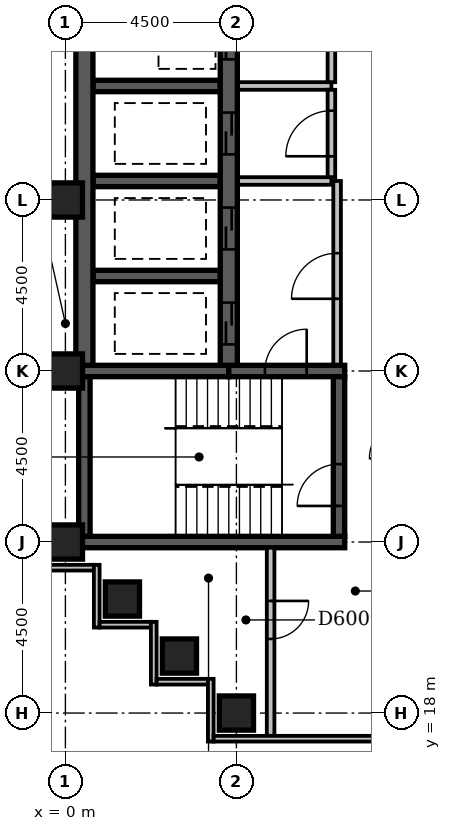
"""IFC4 building model, lengths in metres.
Left out: names, types, materials, properties, quantities, classifications, styles, units other than length and angle.
Written with IfcOpenShell. Run it as: python <this file> out.ifc"""

import sys

from ifc_helpers import new_model, si_unit, direction, frame, frame_2d, origin, origin_2d, place, context, subcontext, project, spatial, rectangle, extrude, element, fill, save


model = new_model("IFC4")
c1 = context("Model", 3, precision=1e-05, world=origin(), true_north=direction((0.0, 1.0)))
c2 = subcontext(c1, "Body", "Model", "MODEL_VIEW")
j1 = project(units=[si_unit("LENGTHUNIT", "METRE"), si_unit("PLANEANGLEUNIT", "RADIAN")], contexts=[c1])
p1 = place(None, origin())
s1 = spatial("IfcSite", under=j1, at=p1, CompositionType="ELEMENT")
p2 = place(p1, origin())
s2 = spatial("IfcBuilding", under=s1, at=p2, CompositionType="ELEMENT")
p3 = place(p2, frame((0.0, 0.0, 233.0)))
s3 = spatial("IfcBuildingStorey", under=s2, at=p3, CompositionType="ELEMENT", Elevation=233.0)
p4 = place(p3, frame((0.35, 22.5, -0.35), z_axis=(0.0, 0.0, 1.0), x_axis=(1.0, 0.0, 0.0)))
e1 = element("IfcWall", 1, at=p4, inside=s3, PredefinedType="SHEAR", context=c2, shape_type="SweptSolid", body=[
    extrude(rectangle(XDim=7.0, YDim=0.3, at=frame_2d((3.5, 0.0))), origin(), (0.0, 0.0, 1.0), 3.65),
])
p5 = place(p3, frame((0.35, 27.0, -0.35), z_axis=(0.0, 0.0, 1.0), x_axis=(1.0, 0.0, 0.0)))
e2 = element("IfcWall", 2, at=p5, inside=s3, PredefinedType="SHEAR", context=c2, shape_type="SweptSolid", body=[
    extrude(rectangle(XDim=3.95, YDim=0.3, at=frame_2d((1.975, 0.0))), origin(), (0.0, 0.0, 1.0), 3.65),
])
p6 = place(p3, frame((0.5, 22.65, -0.35), z_axis=(0.0, 0.0, 1.0), x_axis=(0.0, 1.0, 0.0)))
e3 = element("IfcWall", 3, at=p6, inside=s3, PredefinedType="SHEAR", context=c2, shape_type="SweptSolid", body=[
    extrude(rectangle(XDim=4.2, YDim=0.3, at=frame_2d((2.1, 0.0))), origin(), (0.0, 0.0, 1.0), 3.65),
])
p7 = place(p3, frame((0.5, 27.15, -0.35), z_axis=(0.0, 0.0, 1.0), x_axis=(0.0, 1.0, 0.0)))
e4 = element("IfcWall", 4, at=p7, inside=s3, PredefinedType="SHEAR", context=c2, shape_type="SweptSolid", body=[
    extrude(rectangle(XDim=22.125, YDim=0.45, at=frame_2d((11.062, 0.0))), origin(), (0.0, 0.0, 1.0), 3.65),
])
for number, where, z_axis, x_axis in (
    (5, (0.725, 29.5, -0.35), (0.0, 0.0, 1.0), (1.0, 0.0, 0.0)),
    (6, (0.725, 32.0, -0.35), (0.0, 0.0, 1.0), (1.0, 0.0, 0.0)),
    (7, (0.725, 34.5, -0.35), (0.0, 0.0, 1.0), (1.0, 0.0, 0.0)),
):
    element("IfcWall", number, at=place(p3, frame(where, z_axis=z_axis, x_axis=x_axis)), inside=s3, PredefinedType="SHEAR", context=c2, shape_type="SweptSolid", body=[
        extrude(rectangle(XDim=3.35, YDim=0.3, at=frame_2d((1.675, 0.0))), origin(), (0.0, 0.0, 1.0), 3.65),
    ])
p8 = place(p3, frame((4.3, 27.0, -0.35), z_axis=(0.0, 0.0, 1.0), x_axis=(1.0, 0.0, 0.0)))
e8 = element("IfcWall", 8, at=p8, inside=s3, PredefinedType="SHEAR", context=c2, shape_type="SweptSolid", body=[
    extrude(rectangle(XDim=3.05, YDim=0.3, at=frame_2d((1.525, 0.0))), origin(), (0.0, 0.0, 1.0), 3.65),
])
p9 = place(p8, frame((0.95, 0.0, 0.35)))
e9 = element("IfcOpeningElement", 9, at=p9, cuts=e8, PredefinedType="OPENING", context=c2, shape_type="SweptSolid", body=[
    extrude(rectangle(XDim=1.1, YDim=2.1, at=frame_2d((0.55, 1.05))), frame((0.0, 0.162, 0.0), z_axis=(0.0, -1.0, 0.0), x_axis=(1.0, 0.0, 0.0)), (0.0, 0.0, 1.0), 0.324),
])
p10 = place(p3, frame((4.3, 27.15, -0.35), z_axis=(0.0, 0.0, 1.0), x_axis=(0.0, 1.0, 0.0)))
e10 = element("IfcWall", 10, at=p10, inside=s3, PredefinedType="SHEAR", context=c2, shape_type="SweptSolid", body=[
    extrude(rectangle(XDim=22.125, YDim=0.45, at=frame_2d((11.062, 0.0))), origin(), (0.0, 0.0, 1.0), 3.65),
])
p11 = place(p10, frame((3.05, 0.0, 0.35)))
e11 = element("IfcOpeningElement", 11, at=p11, cuts=e10, PredefinedType="OPENING", context=c2, shape_type="SweptSolid", body=[
    extrude(rectangle(XDim=1.1, YDim=2.1, at=frame_2d((0.55, 1.05))), frame((0.0, 0.237, 0.0), z_axis=(0.0, -1.0, 0.0), x_axis=(1.0, 0.0, 0.0)), (0.0, 0.0, 1.0), 0.474),
])
p12 = place(p10, frame((0.55, 0.0, 0.35)))
e12 = element("IfcOpeningElement", 12, at=p12, cuts=e10, PredefinedType="OPENING", context=c2, shape_type="SweptSolid", body=[
    extrude(rectangle(XDim=1.1, YDim=2.1, at=frame_2d((0.55, 1.05))), frame((0.0, 0.237, 0.0), z_axis=(0.0, -1.0, 0.0), x_axis=(1.0, 0.0, 0.0)), (0.0, 0.0, 1.0), 0.474),
])
p13 = place(p10, frame((20.55, 0.0, 0.35)))
e13 = element("IfcOpeningElement", 13, at=p13, cuts=e10, PredefinedType="OPENING", context=c2, shape_type="SweptSolid", body=[
    extrude(rectangle(XDim=1.1, YDim=2.1, at=frame_2d((0.55, 1.05))), frame((0.0, 0.237, 0.0), z_axis=(0.0, -1.0, 0.0), x_axis=(1.0, 0.0, 0.0)), (0.0, 0.0, 1.0), 0.474),
])
p14 = place(p10, frame((18.05, 0.0, 0.35)))
e14 = element("IfcOpeningElement", 14, at=p14, cuts=e10, PredefinedType="OPENING", context=c2, shape_type="SweptSolid", body=[
    extrude(rectangle(XDim=1.1, YDim=2.1, at=frame_2d((0.55, 1.05))), frame((0.0, 0.237, 0.0), z_axis=(0.0, -1.0, 0.0), x_axis=(1.0, 0.0, 0.0)), (0.0, 0.0, 1.0), 0.474),
])
p15 = place(p10, frame((15.55, 0.0, 0.35)))
e15 = element("IfcOpeningElement", 15, at=p15, cuts=e10, PredefinedType="OPENING", context=c2, shape_type="SweptSolid", body=[
    extrude(rectangle(XDim=1.1, YDim=2.1, at=frame_2d((0.55, 1.05))), frame((0.0, 0.237, 0.0), z_axis=(0.0, -1.0, 0.0), x_axis=(1.0, 0.0, 0.0)), (0.0, 0.0, 1.0), 0.474),
])
p16 = place(p10, frame((13.05, 0.0, 0.35)))
e16 = element("IfcOpeningElement", 16, at=p16, cuts=e10, PredefinedType="OPENING", context=c2, shape_type="SweptSolid", body=[
    extrude(rectangle(XDim=1.1, YDim=2.1, at=frame_2d((0.55, 1.05))), frame((0.0, 0.237, 0.0), z_axis=(0.0, -1.0, 0.0), x_axis=(1.0, 0.0, 0.0)), (0.0, 0.0, 1.0), 0.474),
])
p17 = place(p10, frame((10.55, 0.0, 0.35)))
e17 = element("IfcOpeningElement", 17, at=p17, cuts=e10, PredefinedType="OPENING", context=c2, shape_type="SweptSolid", body=[
    extrude(rectangle(XDim=1.1, YDim=2.1, at=frame_2d((0.55, 1.05))), frame((0.0, 0.237, 0.0), z_axis=(0.0, -1.0, 0.0), x_axis=(1.0, 0.0, 0.0)), (0.0, 0.0, 1.0), 0.474),
])
p18 = place(p10, frame((8.05, 0.0, 0.35)))
e18 = element("IfcOpeningElement", 18, at=p18, cuts=e10, PredefinedType="OPENING", context=c2, shape_type="SweptSolid", body=[
    extrude(rectangle(XDim=1.1, YDim=2.1, at=frame_2d((0.55, 1.05))), frame((0.0, 0.237, 0.0), z_axis=(0.0, -1.0, 0.0), x_axis=(1.0, 0.0, 0.0)), (0.0, 0.0, 1.0), 0.474),
])
p19 = place(p10, frame((5.55, 0.0, 0.35)))
e19 = element("IfcOpeningElement", 19, at=p19, cuts=e10, PredefinedType="OPENING", context=c2, shape_type="SweptSolid", body=[
    extrude(rectangle(XDim=1.1, YDim=2.1, at=frame_2d((0.55, 1.05))), frame((0.0, 0.237, 0.0), z_axis=(0.0, -1.0, 0.0), x_axis=(1.0, 0.0, 0.0)), (0.0, 0.0, 1.0), 0.474),
])
p20 = place(p3, frame((7.2, 22.65, -0.35), z_axis=(0.0, 0.0, 1.0), x_axis=(0.0, 1.0, 0.0)))
e20 = element("IfcWall", 20, at=p20, inside=s3, PredefinedType="SHEAR", context=c2, shape_type="SweptSolid", body=[
    extrude(rectangle(XDim=4.2, YDim=0.3, at=frame_2d((2.1, 0.0))), origin(), (0.0, 0.0, 1.0), 3.65),
])
p21 = place(p20, frame((0.8, 0.0, 0.35)))
e21 = element("IfcOpeningElement", 21, at=p21, cuts=e20, PredefinedType="OPENING", context=c2, shape_type="SweptSolid", body=[
    extrude(rectangle(XDim=1.1, YDim=2.1, at=frame_2d((0.55, 1.05))), frame((0.0, 0.162, 0.0), z_axis=(0.0, -1.0, 0.0), x_axis=(1.0, 0.0, 0.0)), (0.0, 0.0, 1.0), 0.324),
])
for number, where, z_axis, x_axis in (
    (22, (4.5, 18.0, -0.35), (0.0, 0.0, 1.0), (1.0, 0.0, 0.0)),
    (23, (3.0, 19.5, -0.35), (0.0, 0.0, 1.0), (1.0, 0.0, 0.0)),
    (24, (1.5, 21.0, -0.35), (0.0, 0.0, 1.0), (1.0, 0.0, 0.0)),
    (25, (0.0, 22.5, -0.35), (0.0, 0.0, 1.0), (1.0, 0.0, 0.0)),
    (26, (0.0, 27.0, -0.35), (0.0, 0.0, 1.0), (1.0, 0.0, 0.0)),
    (27, (0.0, 31.5, -0.35), (0.0, 0.0, 1.0), (1.0, 0.0, 0.0)),
):
    element("IfcColumn", number, at=place(p3, frame(where, z_axis=z_axis, x_axis=x_axis)), inside=s3, PredefinedType="COLUMN", context=c2, shape_type="SweptSolid", body=[
        extrude(rectangle(XDim=0.9, YDim=0.9, at=origin_2d()), origin(), (0.0, 0.0, 1.0), 3.65),
    ])
p22 = place(p3, frame((-0.6, 21.825, 0.0), z_axis=(0.0, 0.0, 1.0), x_axis=(1.0, 0.0, 0.0)))
e28 = element("IfcWall", 28, at=p22, inside=s3, PredefinedType="STANDARD", context=c2, shape_type="SweptSolid", body=[
    extrude(rectangle(XDim=1.35, YDim=0.15, at=frame_2d((0.675, 0.0))), origin(), (0.0, 0.0, 1.0), 2.7),
])
p23 = place(p3, frame((0.825, 21.9, 0.0), z_axis=(0.0, 0.0, 1.0), x_axis=(0.0, -1.0, 0.0)))
e29 = element("IfcWall", 29, at=p23, inside=s3, PredefinedType="STANDARD", context=c2, shape_type="SweptSolid", body=[
    extrude(rectangle(XDim=1.65, YDim=0.15, at=frame_2d((0.825, 0.0))), origin(), (0.0, 0.0, 1.0), 2.7),
])
p24 = place(p3, frame((0.9, 20.325, 0.0), z_axis=(0.0, 0.0, 1.0), x_axis=(1.0, 0.0, 0.0)))
e30 = element("IfcWall", 30, at=p24, inside=s3, PredefinedType="STANDARD", context=c2, shape_type="SweptSolid", body=[
    extrude(rectangle(XDim=1.35, YDim=0.15, at=frame_2d((0.675, 0.0))), origin(), (0.0, 0.0, 1.0), 2.7),
])
p25 = place(p3, frame((2.325, 20.4, 0.0), z_axis=(0.0, 0.0, 1.0), x_axis=(0.0, -1.0, 0.0)))
e31 = element("IfcWall", 31, at=p25, inside=s3, PredefinedType="STANDARD", context=c2, shape_type="SweptSolid", body=[
    extrude(rectangle(XDim=1.65, YDim=0.15, at=frame_2d((0.825, 0.0))), origin(), (0.0, 0.0, 1.0), 2.7),
])
p26 = place(p3, frame((2.4, 18.825, 0.0), z_axis=(0.0, 0.0, 1.0), x_axis=(1.0, 0.0, 0.0)))
e32 = element("IfcWall", 32, at=p26, inside=s3, PredefinedType="STANDARD", context=c2, shape_type="SweptSolid", body=[
    extrude(rectangle(XDim=1.35, YDim=0.15, at=frame_2d((0.675, 0.0))), origin(), (0.0, 0.0, 1.0), 2.7),
])
p27 = place(p3, frame((3.825, 18.9, 0.0), z_axis=(0.0, 0.0, 1.0), x_axis=(0.0, -1.0, 0.0)))
e33 = element("IfcWall", 33, at=p27, inside=s3, PredefinedType="STANDARD", context=c2, shape_type="SweptSolid", body=[
    extrude(rectangle(XDim=1.65, YDim=0.15, at=frame_2d((0.825, 0.0))), origin(), (0.0, 0.0, 1.0), 2.7),
])
p28 = place(p3, frame((3.9, 17.325, 0.0), z_axis=(0.0, 0.0, 1.0), x_axis=(1.0, 0.0, 0.0)))
e34 = element("IfcWall", 34, at=p28, inside=s3, PredefinedType="STANDARD", context=c2, shape_type="SweptSolid", body=[
    extrude(rectangle(XDim=19.35, YDim=0.15, at=frame_2d((9.675, 0.0))), origin(), (0.0, 0.0, 1.0), 2.7),
])
p29 = place(p28, frame((6.15, 0.0, 0.6)))
e35 = element("IfcOpeningElement", 35, at=p29, cuts=e34, PredefinedType="OPENING", context=c2, shape_type="SweptSolid", body=[
    extrude(rectangle(XDim=2.4, YDim=1.8, at=frame_2d((1.2, 0.9))), frame((0.0, 0.087, 0.0), z_axis=(0.0, -1.0, 0.0), x_axis=(1.0, 0.0, 0.0)), (0.0, 0.0, 1.0), 0.174),
])
p30 = place(p28, frame((14.849, 0.0, 0.6)))
e36 = element("IfcOpeningElement", 36, at=p30, cuts=e34, PredefinedType="OPENING", context=c2, shape_type="SweptSolid", body=[
    extrude(rectangle(XDim=1.2, YDim=1.8, at=frame_2d((0.6, 0.9))), frame((0.0, 0.087, 0.0), z_axis=(0.0, -1.0, 0.0), x_axis=(1.0, 0.0, 0.0)), (0.0, 0.0, 1.0), 0.174),
])
p31 = place(p3, frame((4.545, 34.5, 0.0), z_axis=(0.0, 0.0, 1.0), x_axis=(1.0, 0.0, 0.0)))
e37 = element("IfcWall", 37, at=p31, inside=s3, PredefinedType="PARTITIONING", context=c2, shape_type="SweptSolid", body=[
    extrude(rectangle(XDim=2.455, YDim=0.2, at=frame_2d((1.228, 0.0))), origin(), (0.0, 0.0, 1.0), 3.3),
])
p32 = place(p3, frame((7.0, 34.6, 0.0), z_axis=(0.0, 0.0, 1.0), x_axis=(0.0, 1.0, 0.0)))
e38 = element("IfcWall", 38, at=p32, inside=s3, PredefinedType="PARTITIONING", context=c2, shape_type="SweptSolid", body=[
    extrude(rectangle(XDim=14.9, YDim=0.2, at=frame_2d((7.45, 0.0))), origin(), (0.0, 0.0, 1.0), 3.3),
])
p33 = place(p32, frame((2.8, 0.0, 0.0)))
e39 = element("IfcOpeningElement", 39, at=p33, cuts=e38, PredefinedType="OPENING", context=c2, shape_type="SweptSolid", body=[
    extrude(rectangle(XDim=1.2, YDim=2.1, at=frame_2d((0.6, 1.05))), frame((0.0, 0.112, 0.0), z_axis=(0.0, -1.0, 0.0), x_axis=(1.0, 0.0, 0.0)), (0.0, 0.0, 1.0), 0.224),
])
p34 = place(p32, frame((9.8, 0.0, 0.0)))
e40 = element("IfcOpeningElement", 40, at=p34, cuts=e38, PredefinedType="OPENING", context=c2, shape_type="SweptSolid", body=[
    extrude(rectangle(XDim=1.2, YDim=2.1, at=frame_2d((0.6, 1.05))), frame((0.0, 0.112, 0.0), z_axis=(0.0, -1.0, 0.0), x_axis=(1.0, 0.0, 0.0)), (0.0, 0.0, 1.0), 0.224),
])
p35 = place(p3, frame((4.545, 32.0, 0.0), z_axis=(0.0, 0.0, 1.0), x_axis=(1.0, 0.0, 0.0)))
e41 = element("IfcWall", 41, at=p35, inside=s3, PredefinedType="PARTITIONING", context=c2, shape_type="SweptSolid", body=[
    extrude(rectangle(XDim=2.455, YDim=0.2, at=frame_2d((1.228, 0.0))), origin(), (0.0, 0.0, 1.0), 3.3),
])
p36 = place(p3, frame((7.0, 32.1, 0.0), z_axis=(0.0, 0.0, 1.0), x_axis=(0.0, 1.0, 0.0)))
e42 = element("IfcWall", 42, at=p36, inside=s3, PredefinedType="PARTITIONING", context=c2, shape_type="SweptSolid", body=[
    extrude(rectangle(XDim=2.3, YDim=0.2, at=frame_2d((1.15, 0.0))), origin(), (0.0, 0.0, 1.0), 3.3),
])
p37 = place(p36, frame((0.55, 0.0, 0.0)))
e43 = element("IfcOpeningElement", 43, at=p37, cuts=e42, PredefinedType="OPENING", context=c2, shape_type="SweptSolid", body=[
    extrude(rectangle(XDim=1.2, YDim=2.1, at=frame_2d((0.6, 1.05))), frame((0.0, 0.112, 0.0), z_axis=(0.0, -1.0, 0.0), x_axis=(1.0, 0.0, 0.0)), (0.0, 0.0, 1.0), 0.224),
])
p38 = place(p3, frame((7.15, 27.17, 0.0), z_axis=(0.0, 0.0, 1.0), x_axis=(0.0, 1.0, 0.0)))
e44 = element("IfcWall", 44, at=p38, inside=s3, PredefinedType="PARTITIONING", context=c2, shape_type="SweptSolid", body=[
    extrude(rectangle(XDim=4.83, YDim=0.2, at=frame_2d((2.415, 0.0))), origin(), (0.0, 0.0, 1.0), 3.3),
])
p39 = place(p38, frame((1.73, 0.0, 0.0)))
e45 = element("IfcOpeningElement", 45, at=p39, cuts=e44, PredefinedType="OPENING", context=c2, shape_type="SweptSolid", body=[
    extrude(rectangle(XDim=1.2, YDim=2.1, at=frame_2d((0.6, 1.05))), frame((0.0, 0.112, 0.0), z_axis=(0.0, -1.0, 0.0), x_axis=(1.0, 0.0, 0.0)), (0.0, 0.0, 1.0), 0.224),
])
p40 = place(p3, frame((5.4, 17.4, 0.0), z_axis=(0.0, 0.0, 1.0), x_axis=(0.0, 1.0, 0.0)))
e46 = element("IfcWall", 46, at=p40, inside=s3, PredefinedType="PARTITIONING", context=c2, shape_type="SweptSolid", body=[
    extrude(rectangle(XDim=4.95, YDim=0.2, at=frame_2d((2.475, 0.0))), origin(), (0.0, 0.0, 1.0), 3.3),
])
p41 = place(p40, frame((2.55, 0.0, 0.0)))
e47 = element("IfcOpeningElement", 47, at=p41, cuts=e46, PredefinedType="OPENING", context=c2, shape_type="SweptSolid", body=[
    extrude(rectangle(XDim=1.0, YDim=2.1, at=frame_2d((0.5, 1.05))), frame((0.0, 0.112, 0.0), z_axis=(0.0, -1.0, 0.0), x_axis=(1.0, 0.0, 0.0)), (0.0, 0.0, 1.0), 0.224),
])
p42 = place(p39, origin())
e48 = element("IfcDoor", 48, at=p42, inside=s3, OperationType="SINGLE_SWING_LEFT", PredefinedType="DOOR", context=c2, shape_type="SweptSolid", body=[
    extrude(rectangle(XDim=1.2, YDim=2.1, at=frame_2d((0.6, 1.05))), frame((0.0, 0.025, 0.0), z_axis=(0.0, -1.0, 0.0), x_axis=(1.0, 0.0, 0.0)), (0.0, 0.0, 1.0), 0.05),
])
fill(e45, e48)
p43 = place(p11, origin())
e49 = element("IfcDoor", 49, at=p43, inside=s3, OperationType="SLIDING_TO_LEFT", PredefinedType="DOOR", context=c2, shape_type="SweptSolid", body=[
    extrude(rectangle(XDim=1.1, YDim=2.1, at=frame_2d((0.55, 1.05))), frame((0.0, 0.025, 0.0), z_axis=(0.0, -1.0, 0.0), x_axis=(1.0, 0.0, 0.0)), (0.0, 0.0, 1.0), 0.05),
])
fill(e11, e49)
p44 = place(p12, origin())
e50 = element("IfcDoor", 50, at=p44, inside=s3, OperationType="SLIDING_TO_LEFT", PredefinedType="DOOR", context=c2, shape_type="SweptSolid", body=[
    extrude(rectangle(XDim=1.1, YDim=2.1, at=frame_2d((0.55, 1.05))), frame((0.0, 0.025, 0.0), z_axis=(0.0, -1.0, 0.0), x_axis=(1.0, 0.0, 0.0)), (0.0, 0.0, 1.0), 0.05),
])
fill(e12, e50)
p45 = place(p18, origin())
e51 = element("IfcDoor", 51, at=p45, inside=s3, OperationType="SLIDING_TO_LEFT", PredefinedType="DOOR", context=c2, shape_type="SweptSolid", body=[
    extrude(rectangle(XDim=1.1, YDim=2.1, at=frame_2d((0.55, 1.05))), frame((0.0, 0.025, 0.0), z_axis=(0.0, -1.0, 0.0), x_axis=(1.0, 0.0, 0.0)), (0.0, 0.0, 1.0), 0.05),
])
fill(e18, e51)
p46 = place(p37, origin())
e52 = element("IfcDoor", 52, at=p46, inside=s3, OperationType="SINGLE_SWING_LEFT", PredefinedType="DOOR", context=c2, shape_type="SweptSolid", body=[
    extrude(rectangle(XDim=1.2, YDim=2.1, at=frame_2d((0.6, 1.05))), frame((0.0, 0.025, 0.0), z_axis=(0.0, -1.0, 0.0), x_axis=(1.0, 0.0, 0.0)), (0.0, 0.0, 1.0), 0.05),
])
fill(e43, e52)
p47 = place(p19, origin())
e53 = element("IfcDoor", 53, at=p47, inside=s3, OperationType="SLIDING_TO_LEFT", PredefinedType="DOOR", context=c2, shape_type="SweptSolid", body=[
    extrude(rectangle(XDim=1.1, YDim=2.1, at=frame_2d((0.55, 1.05))), frame((0.0, 0.025, 0.0), z_axis=(0.0, -1.0, 0.0), x_axis=(1.0, 0.0, 0.0)), (0.0, 0.0, 1.0), 0.05),
])
fill(e19, e53)
p48 = place(p9, frame((1.1, 0.0, 0.0), z_axis=(0.0, 0.0, 1.0), x_axis=(-1.0, 0.0, 0.0)))
e54 = element("IfcDoor", 54, at=p48, inside=s3, OperationType="SINGLE_SWING_LEFT", PredefinedType="DOOR", context=c2, shape_type="SweptSolid", body=[
    extrude(rectangle(XDim=1.1, YDim=2.1, at=frame_2d((0.55, 1.05))), frame((0.0, 0.025, 0.0), z_axis=(0.0, -1.0, 0.0), x_axis=(1.0, 0.0, 0.0)), (0.0, 0.0, 1.0), 0.05),
])
fill(e9, e54)
p49 = place(p21, origin())
e55 = element("IfcDoor", 55, at=p49, inside=s3, OperationType="SINGLE_SWING_LEFT", PredefinedType="DOOR", context=c2, shape_type="SweptSolid", body=[
    extrude(rectangle(XDim=1.1, YDim=2.1, at=frame_2d((0.55, 1.05))), frame((0.0, 0.025, 0.0), z_axis=(0.0, -1.0, 0.0), x_axis=(1.0, 0.0, 0.0)), (0.0, 0.0, 1.0), 0.05),
])
fill(e21, e55)
p50 = place(p41, origin())
e56 = element("IfcDoor", 56, at=p50, inside=s3, OperationType="SINGLE_SWING_RIGHT", PredefinedType="DOOR", context=c2, shape_type="SweptSolid", body=[
    extrude(rectangle(XDim=1.0, YDim=2.1, at=frame_2d((0.5, 1.05))), frame((0.0, 0.025, 0.0), z_axis=(0.0, -1.0, 0.0), x_axis=(1.0, 0.0, 0.0)), (0.0, 0.0, 1.0), 0.05),
])
fill(e47, e56)
save(model, sys.argv[1])
